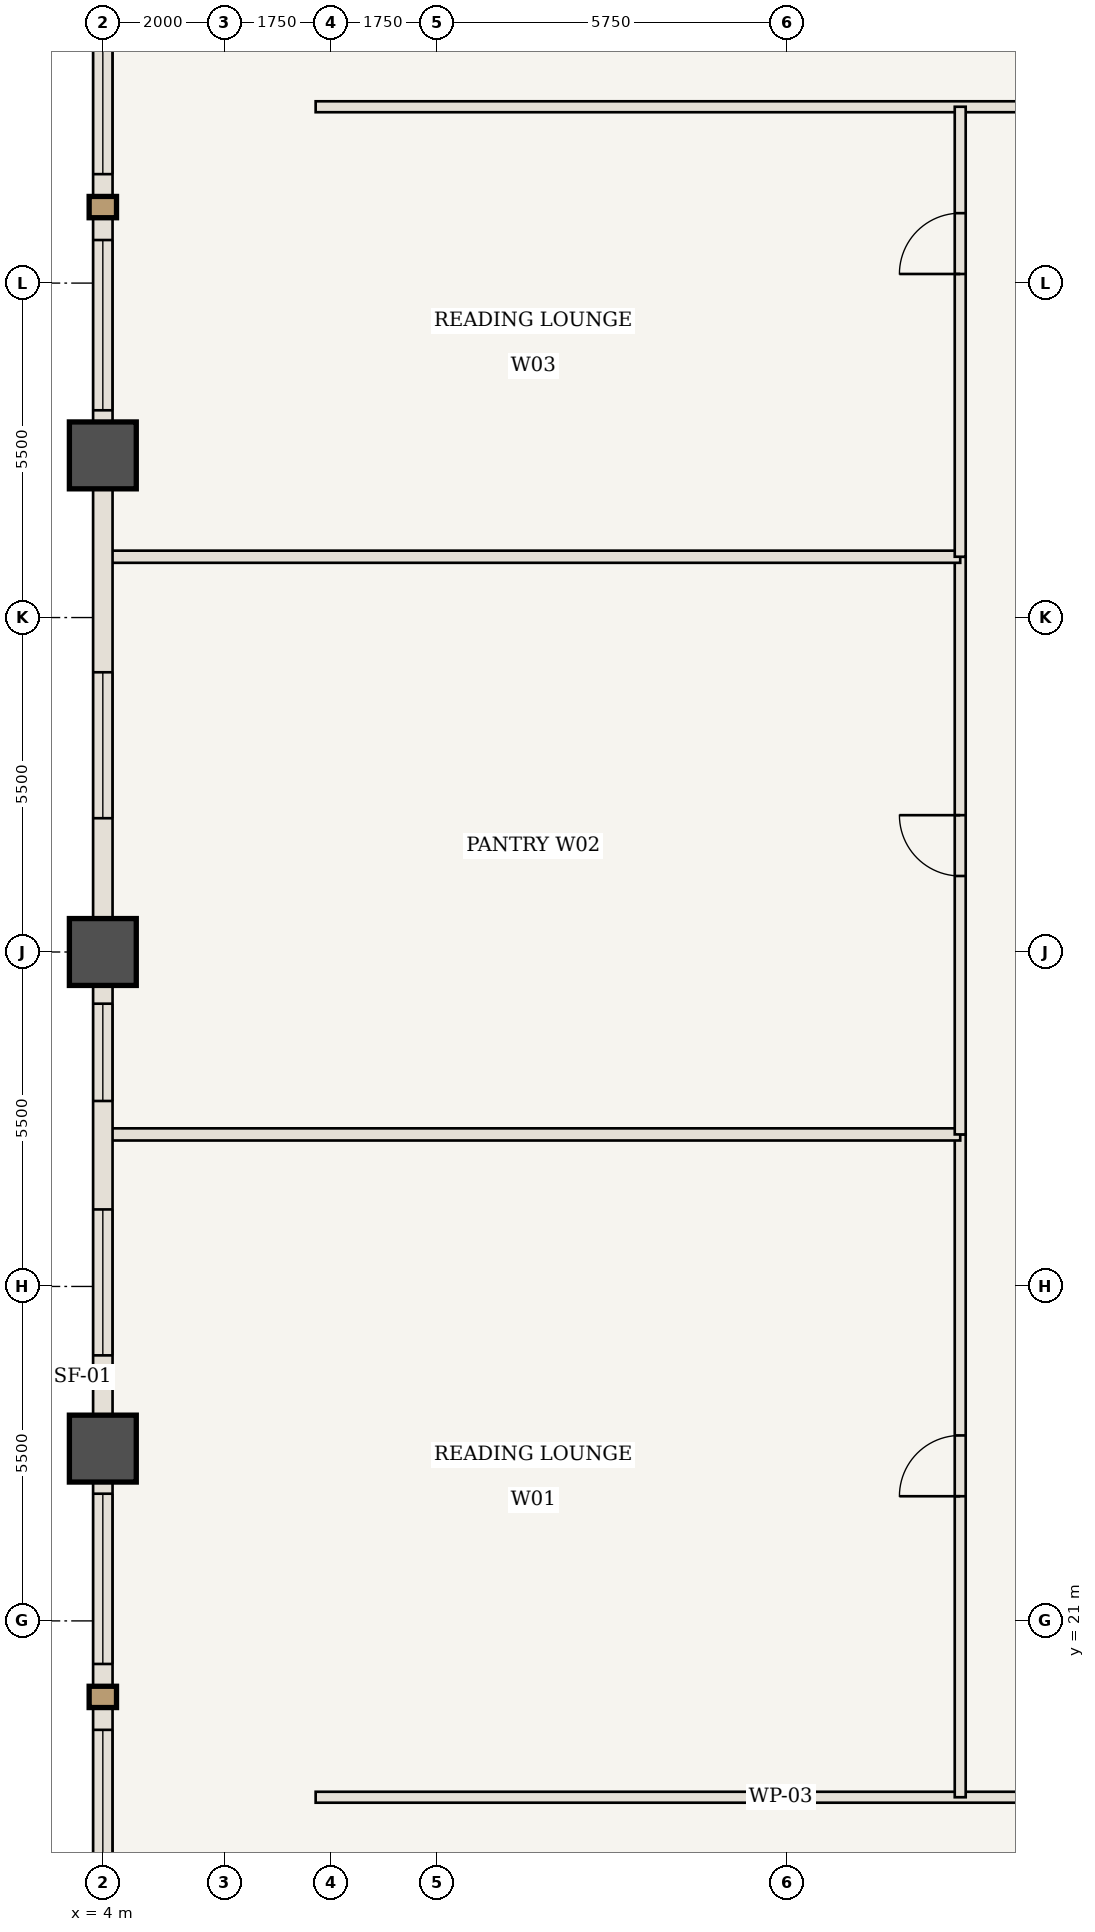
"""IFC4 building model, lengths in metres.
Left out: names, types, materials, properties, quantities, classifications, styles, units other than length and angle.
Written with IfcOpenShell. Run it as: python <this file> out.ifc"""

import sys

from ifc_helpers import new_model, si_unit, direction, frame, frame_2d, origin, origin_2d, place, context, subcontext, project, spatial, rectangle, extrude, element, fill, save


model = new_model("IFC4")
c1 = context("Model", 3, precision=1e-05, world=origin(), true_north=direction((0.0, 1.0)))
c2 = subcontext(c1, "Body", "Model", "MODEL_VIEW")
j1 = project(units=[si_unit("LENGTHUNIT", "METRE"), si_unit("PLANEANGLEUNIT", "RADIAN")], contexts=[c1])
p1 = place(None, origin())
s1 = spatial("IfcSite", under=j1, at=p1, CompositionType="ELEMENT")
p2 = place(p1, origin())
s2 = spatial("IfcBuilding", under=s1, at=p2, CompositionType="ELEMENT")
p3 = place(p2, frame((0.0, 0.0, 49.35)))
s3 = spatial("IfcBuildingStorey", under=s2, at=p3, CompositionType="ELEMENT", Elevation=49.35)
for number, where, z_axis, x_axis in (
    (1, (4.0, 23.833, 0.0), (0.0, 0.0, 1.0), (1.0, 0.0, 0.0)),
    (2, (4.0, 32.0, 0.0), (0.0, 0.0, 1.0), (1.0, 0.0, 0.0)),
    (3, (4.0, 40.167, 0.0), (0.0, 0.0, 1.0), (1.0, 0.0, 0.0)),
):
    element("IfcColumn", number, at=place(p3, frame(where, z_axis=z_axis, x_axis=x_axis)), inside=s3, PredefinedType="COLUMN", context=c2, shape_type="SweptSolid", body=[
        extrude(rectangle(XDim=1.1, YDim=1.1, at=origin_2d()), origin(), (0.0, 0.0, 1.0), 3.5),
    ])
p4 = place(p3, frame((7.5, 18.1, 0.0), z_axis=(0.0, 0.0, 1.0), x_axis=(1.0, 0.0, 0.0)))
e4 = element("IfcWall", 4, at=p4, inside=s3, PredefinedType="STANDARD", context=c2, shape_type="SweptSolid", body=[
    extrude(rectangle(XDim=15.3, YDim=0.18, at=frame_2d((7.65, 0.0))), origin(), (0.0, 0.0, 1.0), 3.32),
])
p5 = place(p4, frame((12.475, 0.0, 0.0)))
e5 = element("IfcOpeningElement", 5, at=p5, cuts=e4, PredefinedType="OPENING", context=c2, shape_type="SweptSolid", body=[
    extrude(rectangle(XDim=1.0, YDim=2.15, at=frame_2d((0.5, 1.075))), frame((0.0, 0.1, 0.0), z_axis=(0.0, -1.0, 0.0), x_axis=(1.0, 0.0, 0.0)), (0.0, 0.0, 1.0), 0.2),
])
p6 = place(p3, frame((7.5, 45.9, 0.0), z_axis=(0.0, 0.0, 1.0), x_axis=(1.0, 0.0, 0.0)))
e6 = element("IfcWall", 6, at=p6, inside=s3, PredefinedType="STANDARD", context=c2, shape_type="SweptSolid", body=[
    extrude(rectangle(XDim=16.4, YDim=0.18, at=frame_2d((8.2, 0.0))), origin(), (0.0, 0.0, 1.0), 3.32),
])
p7 = place(p6, frame((11.575, 0.0, 0.0)))
e7 = element("IfcOpeningElement", 7, at=p7, cuts=e6, PredefinedType="OPENING", context=c2, shape_type="SweptSolid", body=[
    extrude(rectangle(XDim=1.0, YDim=2.15, at=frame_2d((0.5, 1.075))), frame((0.0, 0.1, 0.0), z_axis=(0.0, -1.0, 0.0), x_axis=(1.0, 0.0, 0.0)), (0.0, 0.0, 1.0), 0.2),
])
p8 = place(p3, frame((18.1, 18.1, 0.0), z_axis=(0.0, 0.0, 1.0), x_axis=(0.0, 1.0, 0.0)))
e8 = element("IfcWall", 8, at=p8, inside=s3, PredefinedType="STANDARD", context=c2, shape_type="SweptSolid", body=[
    extrude(rectangle(XDim=10.9, YDim=0.18, at=frame_2d((5.45, 0.0))), origin(), (0.0, 0.0, 1.0), 3.32),
])
p9 = place(p8, frame((4.95, 0.0, 0.0)))
e9 = element("IfcOpeningElement", 9, at=p9, cuts=e8, PredefinedType="OPENING", context=c2, shape_type="SweptSolid", body=[
    extrude(rectangle(XDim=1.0, YDim=2.15, at=frame_2d((0.5, 1.075))), frame((0.0, 0.1, 0.0), z_axis=(0.0, -1.0, 0.0), x_axis=(1.0, 0.0, 0.0)), (0.0, 0.0, 1.0), 0.2),
])
p10 = place(p3, frame((4.06, 29.0, 0.0), z_axis=(0.0, 0.0, 1.0), x_axis=(1.0, 0.0, 0.0)))
e10 = element("IfcWall", 10, at=p10, inside=s3, PredefinedType="STANDARD", context=c2, shape_type="SweptSolid", body=[
    extrude(rectangle(XDim=14.04, YDim=0.2, at=frame_2d((7.02, 0.0))), origin(), (0.0, 0.0, 1.0), 3.32),
])
p11 = place(p3, frame((18.1, 29.0, 0.0), z_axis=(0.0, 0.0, 1.0), x_axis=(0.0, 1.0, 0.0)))
e11 = element("IfcWall", 11, at=p11, inside=s3, PredefinedType="STANDARD", context=c2, shape_type="SweptSolid", body=[
    extrude(rectangle(XDim=9.5, YDim=0.18, at=frame_2d((4.75, 0.0))), origin(), (0.0, 0.0, 1.0), 3.32),
])
p12 = place(p11, frame((4.25, 0.0, 0.0)))
e12 = element("IfcOpeningElement", 12, at=p12, cuts=e11, PredefinedType="OPENING", context=c2, shape_type="SweptSolid", body=[
    extrude(rectangle(XDim=1.0, YDim=2.15, at=frame_2d((0.5, 1.075))), frame((0.0, 0.1, 0.0), z_axis=(0.0, -1.0, 0.0), x_axis=(1.0, 0.0, 0.0)), (0.0, 0.0, 1.0), 0.2),
])
p13 = place(p3, frame((4.06, 38.5, 0.0), z_axis=(0.0, 0.0, 1.0), x_axis=(1.0, 0.0, 0.0)))
e13 = element("IfcWall", 13, at=p13, inside=s3, PredefinedType="STANDARD", context=c2, shape_type="SweptSolid", body=[
    extrude(rectangle(XDim=14.04, YDim=0.2, at=frame_2d((7.02, 0.0))), origin(), (0.0, 0.0, 1.0), 3.32),
])
p14 = place(p3, frame((18.1, 38.5, 0.0), z_axis=(0.0, 0.0, 1.0), x_axis=(0.0, 1.0, 0.0)))
e14 = element("IfcWall", 14, at=p14, inside=s3, PredefinedType="STANDARD", context=c2, shape_type="SweptSolid", body=[
    extrude(rectangle(XDim=7.4, YDim=0.18, at=frame_2d((3.7, 0.0))), origin(), (0.0, 0.0, 1.0), 3.32),
])
p15 = place(p14, frame((4.65, 0.0, 0.0)))
e15 = element("IfcOpeningElement", 15, at=p15, cuts=e14, PredefinedType="OPENING", context=c2, shape_type="SweptSolid", body=[
    extrude(rectangle(XDim=1.0, YDim=2.15, at=frame_2d((0.5, 1.075))), frame((0.0, 0.1, 0.0), z_axis=(0.0, -1.0, 0.0), x_axis=(1.0, 0.0, 0.0)), (0.0, 0.0, 1.0), 0.2),
])
p16 = place(p3, frame((4.0, 15.667, 0.0), z_axis=(0.0, 0.0, 1.0), x_axis=(0.0, 1.0, 0.0)))
e16 = element("IfcWall", 16, at=p16, inside=s3, PredefinedType="USERDEFINED", context=c2, shape_type="SweptSolid", body=[
    extrude(rectangle(XDim=8.167, YDim=0.32, at=frame_2d((4.083, 0.0))), origin(), (0.0, 0.0, 1.0), 2.52),
])
p17 = place(p16, frame((0.742, 0.0, 0.85)))
e17 = element("IfcOpeningElement", 17, at=p17, cuts=e16, PredefinedType="OPENING", context=c2, shape_type="SweptSolid", body=[
    extrude(rectangle(XDim=2.8, YDim=1.47, at=frame_2d((1.4, 0.735))), frame((0.0, 0.17, 0.0), z_axis=(0.0, -1.0, 0.0), x_axis=(1.0, 0.0, 0.0)), (0.0, 0.0, 1.0), 0.34),
])
p18 = place(p16, frame((4.625, 0.0, 0.85)))
e18 = element("IfcOpeningElement", 18, at=p18, cuts=e16, PredefinedType="OPENING", context=c2, shape_type="SweptSolid", body=[
    extrude(rectangle(XDim=2.8, YDim=1.47, at=frame_2d((1.4, 0.735))), frame((0.0, 0.17, 0.0), z_axis=(0.0, -1.0, 0.0), x_axis=(1.0, 0.0, 0.0)), (0.0, 0.0, 1.0), 0.34),
])
p19 = place(p3, frame((4.0, 23.833, 0.0), z_axis=(0.0, 0.0, 1.0), x_axis=(0.0, 1.0, 0.0)))
e19 = element("IfcWall", 19, at=p19, inside=s3, PredefinedType="USERDEFINED", context=c2, shape_type="SweptSolid", body=[
    extrude(rectangle(XDim=8.167, YDim=0.32, at=frame_2d((4.083, 0.0))), origin(), (0.0, 0.0, 1.0), 2.52),
])
p20 = place(p19, frame((1.533, 0.0, 0.85)))
e20 = element("IfcOpeningElement", 20, at=p20, cuts=e19, PredefinedType="OPENING", context=c2, shape_type="SweptSolid", body=[
    extrude(rectangle(XDim=2.4, YDim=1.47, at=frame_2d((1.2, 0.735))), frame((0.0, 0.17, 0.0), z_axis=(0.0, -1.0, 0.0), x_axis=(1.0, 0.0, 0.0)), (0.0, 0.0, 1.0), 0.34),
])
p21 = place(p19, frame((5.717, 0.0, 0.85)))
e21 = element("IfcOpeningElement", 21, at=p21, cuts=e19, PredefinedType="OPENING", context=c2, shape_type="SweptSolid", body=[
    extrude(rectangle(XDim=1.6, YDim=1.47, at=frame_2d((0.8, 0.735))), frame((0.0, 0.17, 0.0), z_axis=(0.0, -1.0, 0.0), x_axis=(1.0, 0.0, 0.0)), (0.0, 0.0, 1.0), 0.34),
])
p22 = place(p3, frame((4.0, 32.0, 0.0), z_axis=(0.0, 0.0, 1.0), x_axis=(0.0, 1.0, 0.0)))
e22 = element("IfcWall", 22, at=p22, inside=s3, PredefinedType="USERDEFINED", context=c2, shape_type="SweptSolid", body=[
    extrude(rectangle(XDim=8.167, YDim=0.32, at=frame_2d((4.083, 0.0))), origin(), (0.0, 0.0, 1.0), 2.52),
])
p23 = place(p22, frame((2.2, 0.0, 0.85)))
e23 = element("IfcOpeningElement", 23, at=p23, cuts=e22, PredefinedType="OPENING", context=c2, shape_type="SweptSolid", body=[
    extrude(rectangle(XDim=2.4, YDim=1.47, at=frame_2d((1.2, 0.735))), frame((0.0, 0.17, 0.0), z_axis=(0.0, -1.0, 0.0), x_axis=(1.0, 0.0, 0.0)), (0.0, 0.0, 1.0), 0.34),
])
p24 = place(p3, frame((4.0, 40.167, 0.0), z_axis=(0.0, 0.0, 1.0), x_axis=(0.0, 1.0, 0.0)))
e24 = element("IfcWall", 24, at=p24, inside=s3, PredefinedType="USERDEFINED", context=c2, shape_type="SweptSolid", body=[
    extrude(rectangle(XDim=8.167, YDim=0.32, at=frame_2d((4.083, 0.0))), origin(), (0.0, 0.0, 1.0), 2.52),
])
p25 = place(p24, frame((0.742, 0.0, 0.85)))
e25 = element("IfcOpeningElement", 25, at=p25, cuts=e24, PredefinedType="OPENING", context=c2, shape_type="SweptSolid", body=[
    extrude(rectangle(XDim=2.8, YDim=1.47, at=frame_2d((1.4, 0.735))), frame((0.0, 0.17, 0.0), z_axis=(0.0, -1.0, 0.0), x_axis=(1.0, 0.0, 0.0)), (0.0, 0.0, 1.0), 0.34),
])
p26 = place(p24, frame((4.625, 0.0, 0.85)))
e26 = element("IfcOpeningElement", 26, at=p26, cuts=e24, PredefinedType="OPENING", context=c2, shape_type="SweptSolid", body=[
    extrude(rectangle(XDim=2.8, YDim=1.47, at=frame_2d((1.4, 0.735))), frame((0.0, 0.17, 0.0), z_axis=(0.0, -1.0, 0.0), x_axis=(1.0, 0.0, 0.0)), (0.0, 0.0, 1.0), 0.34),
])
p27 = place(p9, origin())
e27 = element("IfcDoor", 27, at=p27, inside=s3, OperationType="SINGLE_SWING_LEFT", PredefinedType="DOOR", context=c2, shape_type="SweptSolid", body=[
    extrude(rectangle(XDim=1.0, YDim=2.15, at=frame_2d((0.5, 1.075))), frame((0.0, 0.025, 0.0), z_axis=(0.0, -1.0, 0.0), x_axis=(1.0, 0.0, 0.0)), (0.0, 0.0, 1.0), 0.05),
])
fill(e9, e27)
p28 = place(p12, origin())
e28 = element("IfcDoor", 28, at=p28, inside=s3, OperationType="SINGLE_SWING_RIGHT", PredefinedType="DOOR", context=c2, shape_type="SweptSolid", body=[
    extrude(rectangle(XDim=1.0, YDim=2.15, at=frame_2d((0.5, 1.075))), frame((0.0, 0.025, 0.0), z_axis=(0.0, -1.0, 0.0), x_axis=(1.0, 0.0, 0.0)), (0.0, 0.0, 1.0), 0.05),
])
fill(e12, e28)
p29 = place(p15, origin())
e29 = element("IfcDoor", 29, at=p29, inside=s3, OperationType="SINGLE_SWING_LEFT", PredefinedType="DOOR", context=c2, shape_type="SweptSolid", body=[
    extrude(rectangle(XDim=1.0, YDim=2.15, at=frame_2d((0.5, 1.075))), frame((0.0, 0.025, 0.0), z_axis=(0.0, -1.0, 0.0), x_axis=(1.0, 0.0, 0.0)), (0.0, 0.0, 1.0), 0.05),
])
fill(e15, e29)
p30 = place(p17, origin())
e30 = element("IfcWindow", 30, at=p30, inside=s3, PartitioningType="SINGLE_PANEL", PredefinedType="WINDOW", context=c2, shape_type="SweptSolid", body=[
    extrude(rectangle(XDim=2.8, YDim=1.47, at=frame_2d((1.4, 0.735))), frame((0.0, 0.03, 0.0), z_axis=(0.0, -1.0, 0.0), x_axis=(1.0, 0.0, 0.0)), (0.0, 0.0, 1.0), 0.06),
])
fill(e17, e30)
p31 = place(p18, origin())
e31 = element("IfcWindow", 31, at=p31, inside=s3, PartitioningType="SINGLE_PANEL", PredefinedType="WINDOW", context=c2, shape_type="SweptSolid", body=[
    extrude(rectangle(XDim=2.8, YDim=1.47, at=frame_2d((1.4, 0.735))), frame((0.0, 0.03, 0.0), z_axis=(0.0, -1.0, 0.0), x_axis=(1.0, 0.0, 0.0)), (0.0, 0.0, 1.0), 0.06),
])
fill(e18, e31)
p32 = place(p20, origin())
e32 = element("IfcWindow", 32, at=p32, inside=s3, PartitioningType="SINGLE_PANEL", PredefinedType="WINDOW", context=c2, shape_type="SweptSolid", body=[
    extrude(rectangle(XDim=2.4, YDim=1.47, at=frame_2d((1.2, 0.735))), frame((0.0, 0.03, 0.0), z_axis=(0.0, -1.0, 0.0), x_axis=(1.0, 0.0, 0.0)), (0.0, 0.0, 1.0), 0.06),
])
fill(e20, e32)
p33 = place(p21, origin())
e33 = element("IfcWindow", 33, at=p33, inside=s3, PartitioningType="SINGLE_PANEL", PredefinedType="WINDOW", context=c2, shape_type="SweptSolid", body=[
    extrude(rectangle(XDim=1.6, YDim=1.47, at=frame_2d((0.8, 0.735))), frame((0.0, 0.03, 0.0), z_axis=(0.0, -1.0, 0.0), x_axis=(1.0, 0.0, 0.0)), (0.0, 0.0, 1.0), 0.06),
])
fill(e21, e33)
p34 = place(p23, origin())
e34 = element("IfcWindow", 34, at=p34, inside=s3, PartitioningType="SINGLE_PANEL", PredefinedType="WINDOW", context=c2, shape_type="SweptSolid", body=[
    extrude(rectangle(XDim=2.4, YDim=1.47, at=frame_2d((1.2, 0.735))), frame((0.0, 0.03, 0.0), z_axis=(0.0, -1.0, 0.0), x_axis=(1.0, 0.0, 0.0)), (0.0, 0.0, 1.0), 0.06),
])
fill(e23, e34)
p35 = place(p25, origin())
e35 = element("IfcWindow", 35, at=p35, inside=s3, PartitioningType="SINGLE_PANEL", PredefinedType="WINDOW", context=c2, shape_type="SweptSolid", body=[
    extrude(rectangle(XDim=2.8, YDim=1.47, at=frame_2d((1.4, 0.735))), frame((0.0, 0.03, 0.0), z_axis=(0.0, -1.0, 0.0), x_axis=(1.0, 0.0, 0.0)), (0.0, 0.0, 1.0), 0.06),
])
fill(e25, e35)
p36 = place(p26, origin())
e36 = element("IfcWindow", 36, at=p36, inside=s3, PartitioningType="SINGLE_PANEL", PredefinedType="WINDOW", context=c2, shape_type="SweptSolid", body=[
    extrude(rectangle(XDim=2.8, YDim=1.47, at=frame_2d((1.4, 0.735))), frame((0.0, 0.03, 0.0), z_axis=(0.0, -1.0, 0.0), x_axis=(1.0, 0.0, 0.0)), (0.0, 0.0, 1.0), 0.06),
])
fill(e26, e36)
save(model, sys.argv[1])
